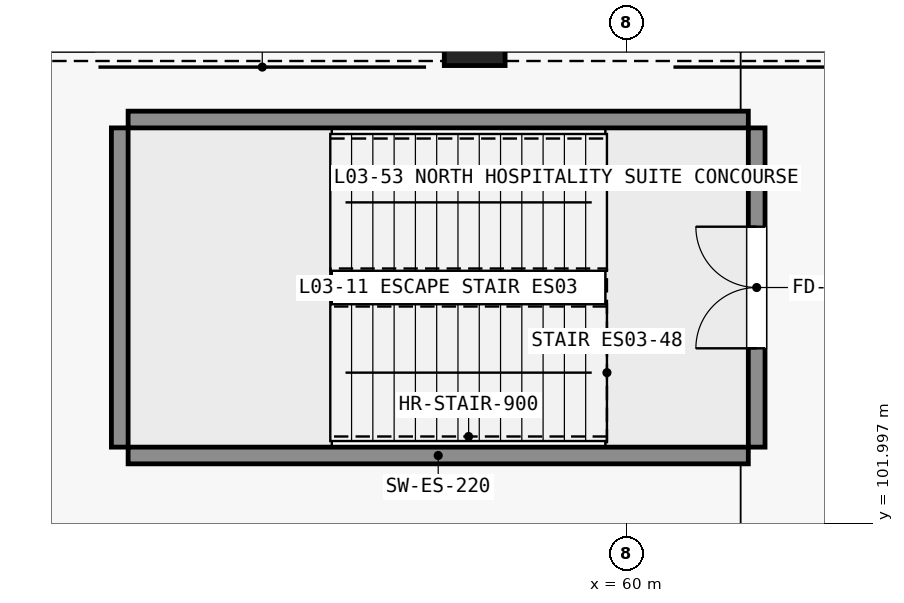
"""IFC4 building model, lengths in metres.
Left out: names, types, materials, properties, quantities, classifications, styles, units other than length and angle.
Written with IfcOpenShell. Run it as: python <this file> out.ifc"""

import sys

from ifc_helpers import new_model, si_unit, direction, frame, frame_2d, origin, origin_2d, place, context, subcontext, project, spatial, rectangle, extrude, element, fill, save


model = new_model("IFC4")
c1 = context("Model", 3, precision=1e-05, world=origin(), true_north=direction((0.0, 1.0)))
c2 = subcontext(c1, "Body", "Model", "MODEL_VIEW")
j1 = project(units=[si_unit("LENGTHUNIT", "METRE"), si_unit("PLANEANGLEUNIT", "RADIAN")], contexts=[c1])
p1 = place(None, origin())
s1 = spatial("IfcSite", under=j1, at=p1, CompositionType="ELEMENT")
p2 = place(p1, origin())
s2 = spatial("IfcBuilding", under=s1, at=p2, CompositionType="ELEMENT")
p3 = place(p2, frame((0.0, 0.0, 16.2)))
s3 = spatial("IfcBuildingStorey", under=s2, at=p3, CompositionType="ELEMENT", Elevation=16.2)
p4 = place(p3, frame((58.0, 108.42, 0.0), z_axis=(0.0, 0.0, 1.0), x_axis=(1.0, 0.0, 0.0)))
e1 = element("IfcColumn", 1, at=p4, inside=s3, PredefinedType="PILASTER", context=c2, shape_type="SweptSolid", body=[
    extrude(rectangle(XDim=0.8, YDim=0.8, at=origin_2d()), origin(), (0.0, 0.0, 1.0), 4.46),
])
for number, where, z_axis, x_axis in (
    (2, (53.44, 102.89, 0.0), (0.0, 0.0, 1.0), (1.0, 0.0, 0.0)),
    (3, (53.44, 107.31, 0.0), (0.0, 0.0, 1.0), (1.0, 0.0, 0.0)),
):
    element("IfcWall", number, at=place(p3, frame(where, z_axis=z_axis, x_axis=x_axis)), inside=s3, PredefinedType="SHEAR", context=c2, shape_type="SweptSolid", body=[
        extrude(rectangle(XDim=8.16, YDim=0.22, at=frame_2d((4.08, 0.0))), origin(), (0.0, 0.0, 1.0), 4.8),
    ])
p5 = place(p3, frame((53.33, 103.0, 0.0), z_axis=(0.0, 0.0, 1.0), x_axis=(0.0, 1.0, 0.0)))
e4 = element("IfcWall", 4, at=p5, inside=s3, PredefinedType="SHEAR", context=c2, shape_type="SweptSolid", body=[
    extrude(rectangle(XDim=4.2, YDim=0.22, at=frame_2d((2.1, 0.0))), origin(), (0.0, 0.0, 1.0), 4.8),
])
p6 = place(p3, frame((61.71, 103.0, 0.0), z_axis=(0.0, 0.0, 1.0), x_axis=(0.0, 1.0, 0.0)))
e5 = element("IfcWall", 5, at=p6, inside=s3, PredefinedType="SHEAR", context=c2, shape_type="SweptSolid", body=[
    extrude(rectangle(XDim=4.2, YDim=0.22, at=frame_2d((2.1, 0.0))), origin(), (0.0, 0.0, 1.0), 4.8),
])
p7 = place(p6, frame((1.3, 0.0, 0.0)))
e6 = element("IfcOpeningElement", 6, at=p7, cuts=e5, PredefinedType="OPENING", context=c2, shape_type="SweptSolid", body=[
    extrude(rectangle(XDim=1.6, YDim=2.2, at=frame_2d((0.8, 1.1))), frame((0.0, 0.12, 0.0), z_axis=(0.0, -1.0, 0.0), x_axis=(1.0, 0.0, 0.0)), (0.0, 0.0, 1.0), 0.24),
])
p8 = place(p7, origin())
e7 = element("IfcDoor", 7, at=p8, inside=s3, OperationType="DOUBLE_DOOR_SINGLE_SWING", PredefinedType="DOOR", context=c2, shape_type="SweptSolid", body=[
    extrude(rectangle(XDim=1.6, YDim=2.2, at=frame_2d((0.8, 1.1))), frame((0.0, 0.025, 0.0), z_axis=(0.0, -1.0, 0.0), x_axis=(1.0, 0.0, 0.0)), (0.0, 0.0, 1.0), 0.05),
])
fill(e6, e7)
save(model, sys.argv[1])
